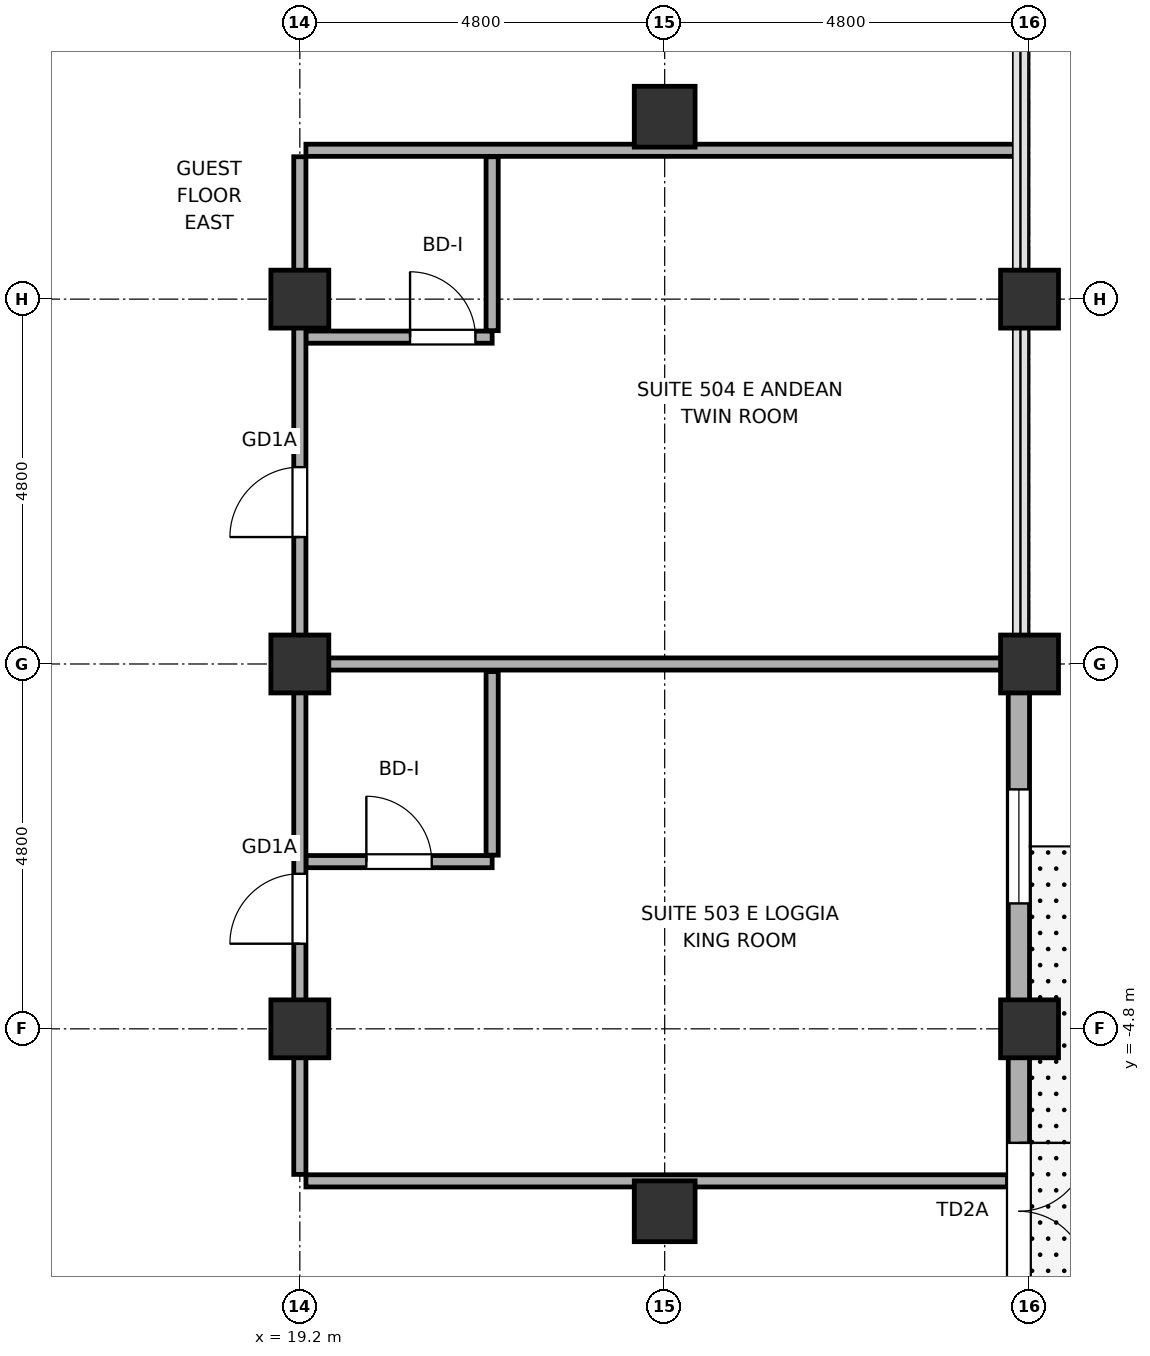
"""IFC4 building model, lengths in metres.
Left out: names, types, materials, properties, quantities, classifications, styles, units other than length and angle.
Written with IfcOpenShell. Run it as: python <this file> out.ifc"""

import sys

from ifc_helpers import new_model, si_unit, direction, frame, frame_2d, origin, origin_2d, place, context, subcontext, project, spatial, rectangle, hollow_rectangle, hollow_circle, extrude, element, fill, save


model = new_model("IFC4")
c1 = context("Model", 3, precision=1e-05, world=origin(), true_north=direction((0.0, 1.0)))
c2 = subcontext(c1, "Body", "Model", "MODEL_VIEW")
j1 = project(units=[si_unit("LENGTHUNIT", "METRE"), si_unit("PLANEANGLEUNIT", "RADIAN")], contexts=[c1])
p1 = place(None, origin())
s1 = spatial("IfcSite", under=j1, at=p1, CompositionType="ELEMENT")
p2 = place(p1, origin())
s2 = spatial("IfcBuilding", under=s1, at=p2, CompositionType="ELEMENT")
p3 = place(p2, frame((0.0, 0.0, 30.0)))
s3 = spatial("IfcBuildingStorey", under=s2, at=p3, CompositionType="ELEMENT", Elevation=30.0)
for number, where, z_axis, x_axis in (
    (1, (19.2, -4.8, 0.0), (0.0, 0.0, 1.0), (1.0, 0.0, 0.0)),
    (2, (19.2, 0.0, 0.0), (0.0, 0.0, 1.0), (1.0, 0.0, 0.0)),
    (3, (19.2, 4.8, 0.0), (0.0, 0.0, 1.0), (1.0, 0.0, 0.0)),
):
    element("IfcColumn", number, at=place(p3, frame(where, z_axis=z_axis, x_axis=x_axis)), inside=s3, PredefinedType="COLUMN", context=c2, shape_type="SweptSolid", body=[
        extrude(hollow_circle(Radius=0.381, WallThickness=0.032, at=origin_2d()), origin(), (0.0, 0.0, 1.0), 3.7),
    ])
for number, where, z_axis, x_axis in (
    (4, (24.0, -7.2, 0.0), (0.0, 0.0, 1.0), (1.0, 0.0, 0.0)),
    (5, (24.0, 7.2, 0.0), (0.0, 0.0, 1.0), (1.0, 0.0, 0.0)),
):
    element("IfcColumn", number, at=place(p3, frame(where, z_axis=z_axis, x_axis=x_axis)), inside=s3, PredefinedType="COLUMN", context=c2, shape_type="SweptSolid", body=[
        extrude(hollow_rectangle(XDim=0.8, YDim=0.8, WallThickness=0.036, at=origin_2d()), origin(), (0.0, 0.0, 1.0), 3.7),
    ])
for number, where, z_axis, x_axis in (
    (6, (28.8, -4.8, 0.0), (0.0, 0.0, 1.0), (1.0, 0.0, 0.0)),
    (7, (28.8, 0.0, 0.0), (0.0, 0.0, 1.0), (1.0, 0.0, 0.0)),
    (8, (28.8, 4.8, 0.0), (0.0, 0.0, 1.0), (1.0, 0.0, 0.0)),
):
    element("IfcColumn", number, at=place(p3, frame(where, z_axis=z_axis, x_axis=x_axis)), inside=s3, PredefinedType="COLUMN", context=c2, shape_type="SweptSolid", body=[
        extrude(hollow_circle(Radius=0.381, WallThickness=0.032, at=origin_2d()), origin(), (0.0, 0.0, 1.0), 3.7),
    ])
p4 = place(p3, frame((28.66, -20.4, 0.0), z_axis=(0.0, 0.0, 1.0), x_axis=(0.0, 1.0, 0.0)))
e9 = element("IfcWall", 9, at=p4, inside=s3, PredefinedType="SOLIDWALL", context=c2, shape_type="SweptSolid", body=[
    extrude(rectangle(XDim=20.38, YDim=0.28, at=frame_2d((10.19, 0.0))), origin(), (0.0, 0.0, 1.0), 2.12),
])
p5 = place(p4, frame((12.3, 0.0, 0.0)))
e10 = element("IfcOpeningElement", 10, at=p5, cuts=e9, PredefinedType="OPENING", context=c2, shape_type="SweptSolid", body=[
    extrude(rectangle(XDim=1.8, YDim=2.02, at=frame_2d((0.9, 1.01))), frame((0.0, 0.155, 0.0), z_axis=(0.0, -1.0, 0.0), x_axis=(1.0, 0.0, 0.0)), (0.0, 0.0, 1.0), 0.31),
])
p6 = place(p4, frame((17.25, 0.0, 0.75)))
e11 = element("IfcOpeningElement", 11, at=p6, cuts=e9, PredefinedType="OPENING", context=c2, shape_type="SweptSolid", body=[
    extrude(rectangle(XDim=1.5, YDim=1.15, at=frame_2d((0.75, 0.575))), frame((0.0, 0.155, 0.0), z_axis=(0.0, -1.0, 0.0), x_axis=(1.0, 0.0, 0.0)), (0.0, 0.0, 1.0), 0.31),
])
p7 = place(p3, frame((19.28, -6.8, 0.0), z_axis=(0.0, 0.0, 1.0), x_axis=(1.0, 0.0, 0.0)))
e12 = element("IfcWall", 12, at=p7, inside=s3, PredefinedType="PARTITIONING", context=c2, shape_type="SweptSolid", body=[
    extrude(rectangle(XDim=9.23, YDim=0.16, at=frame_2d((4.615, 0.0))), origin(), (0.0, 0.0, 1.0), 2.12),
])
p8 = place(p3, frame((19.28, -2.6, 0.0), z_axis=(0.0, 0.0, 1.0), x_axis=(1.0, 0.0, 0.0)))
e13 = element("IfcWall", 13, at=p8, inside=s3, PredefinedType="PARTITIONING", context=c2, shape_type="SweptSolid", body=[
    extrude(rectangle(XDim=2.45, YDim=0.16, at=frame_2d((1.225, 0.0))), origin(), (0.0, 0.0, 1.0), 2.82),
])
p9 = place(p8, frame((0.795, 0.0, 0.0)))
e14 = element("IfcOpeningElement", 14, at=p9, cuts=e13, PredefinedType="OPENING", context=c2, shape_type="SweptSolid", body=[
    extrude(rectangle(XDim=0.86, YDim=2.1, at=frame_2d((0.43, 1.05))), frame((0.0, 0.095, 0.0), z_axis=(0.0, -1.0, 0.0), x_axis=(1.0, 0.0, 0.0)), (0.0, 0.0, 1.0), 0.19),
])
p10 = place(p3, frame((19.28, 0.0, 0.0), z_axis=(0.0, 0.0, 1.0), x_axis=(1.0, 0.0, 0.0)))
e15 = element("IfcWall", 15, at=p10, inside=s3, PredefinedType="PARTITIONING", context=c2, shape_type="SweptSolid", body=[
    extrude(rectangle(XDim=9.35, YDim=0.16, at=frame_2d((4.675, 0.0))), origin(), (0.0, 0.0, 1.0), 2.82),
])
p11 = place(p3, frame((19.28, 4.3, 0.0), z_axis=(0.0, 0.0, 1.0), x_axis=(1.0, 0.0, 0.0)))
e16 = element("IfcWall", 16, at=p11, inside=s3, PredefinedType="PARTITIONING", context=c2, shape_type="SweptSolid", body=[
    extrude(rectangle(XDim=2.45, YDim=0.16, at=frame_2d((1.225, 0.0))), origin(), (0.0, 0.0, 1.0), 2.82),
])
p12 = place(p11, frame((1.37, 0.0, 0.0)))
e17 = element("IfcOpeningElement", 17, at=p12, cuts=e16, PredefinedType="OPENING", context=c2, shape_type="SweptSolid", body=[
    extrude(rectangle(XDim=0.86, YDim=2.1, at=frame_2d((0.43, 1.05))), frame((0.0, 0.095, 0.0), z_axis=(0.0, -1.0, 0.0), x_axis=(1.0, 0.0, 0.0)), (0.0, 0.0, 1.0), 0.19),
])
p13 = place(p3, frame((19.28, 6.758, 0.0), z_axis=(0.0, 0.0, 1.0), x_axis=(1.0, 0.0, 0.0)))
e18 = element("IfcWall", 18, at=p13, inside=s3, PredefinedType="PARTITIONING", context=c2, shape_type="SweptSolid", body=[
    extrude(rectangle(XDim=9.35, YDim=0.16, at=frame_2d((4.675, 0.0))), origin(), (0.0, 0.0, 1.0), 2.12),
])
p14 = place(p3, frame((19.2, -6.715, 0.0), z_axis=(0.0, 0.0, 1.0), x_axis=(0.0, 1.0, 0.0)))
e19 = element("IfcWall", 19, at=p14, inside=s3, PredefinedType="PARTITIONING", context=c2, shape_type="SweptSolid", body=[
    extrude(rectangle(XDim=13.388, YDim=0.16, at=frame_2d((6.694, 0.0))), origin(), (0.0, 0.0, 1.0), 2.12),
])
p15 = place(p14, frame((3.035, 0.0, 0.0)))
e20 = element("IfcOpeningElement", 20, at=p15, cuts=e19, PredefinedType="OPENING", context=c2, shape_type="SweptSolid", body=[
    extrude(rectangle(XDim=0.92, YDim=2.02, at=frame_2d((0.46, 1.01))), frame((0.0, 0.095, 0.0), z_axis=(0.0, -1.0, 0.0), x_axis=(1.0, 0.0, 0.0)), (0.0, 0.0, 1.0), 0.19),
])
p16 = place(p14, frame((8.385, 0.0, 0.0)))
e21 = element("IfcOpeningElement", 21, at=p16, cuts=e19, PredefinedType="OPENING", context=c2, shape_type="SweptSolid", body=[
    extrude(rectangle(XDim=0.92, YDim=2.02, at=frame_2d((0.46, 1.01))), frame((0.0, 0.095, 0.0), z_axis=(0.0, -1.0, 0.0), x_axis=(1.0, 0.0, 0.0)), (0.0, 0.0, 1.0), 0.19),
])
p17 = place(p3, frame((21.73, -2.515, 0.0), z_axis=(0.0, 0.0, 1.0), x_axis=(0.0, 1.0, 0.0)))
e22 = element("IfcWall", 22, at=p17, inside=s3, PredefinedType="PARTITIONING", context=c2, shape_type="SweptSolid", body=[
    extrude(rectangle(XDim=2.415, YDim=0.16, at=frame_2d((1.208, 0.0))), origin(), (0.0, 0.0, 1.0), 3.52),
])
p18 = place(p3, frame((21.73, 4.385, 0.0), z_axis=(0.0, 0.0, 1.0), x_axis=(0.0, 1.0, 0.0)))
e23 = element("IfcWall", 23, at=p18, inside=s3, PredefinedType="PARTITIONING", context=c2, shape_type="SweptSolid", body=[
    extrude(rectangle(XDim=2.288, YDim=0.16, at=frame_2d((1.144, 0.0))), origin(), (0.0, 0.0, 1.0), 3.52),
])
p19 = place(p5, origin())
e24 = element("IfcDoor", 24, at=p19, inside=s3, OperationType="DOUBLE_DOOR_SINGLE_SWING", PredefinedType="DOOR", context=c2, shape_type="SweptSolid", body=[
    extrude(rectangle(XDim=1.8, YDim=2.02, at=frame_2d((0.9, 1.01))), frame((0.0, 0.025, 0.0), z_axis=(0.0, -1.0, 0.0), x_axis=(1.0, 0.0, 0.0)), (0.0, 0.0, 1.0), 0.05),
])
fill(e10, e24)
p20 = place(p6, origin())
e25 = element("IfcWindow", 25, at=p20, inside=s3, PartitioningType="SINGLE_PANEL", PredefinedType="WINDOW", context=c2, shape_type="SweptSolid", body=[
    extrude(rectangle(XDim=1.5, YDim=1.15, at=frame_2d((0.75, 0.575))), frame((0.0, 0.03, 0.0), z_axis=(0.0, -1.0, 0.0), x_axis=(1.0, 0.0, 0.0)), (0.0, 0.0, 1.0), 0.06),
])
fill(e11, e25)
p21 = place(p15, origin())
e26 = element("IfcDoor", 26, at=p21, inside=s3, OperationType="SINGLE_SWING_RIGHT", PredefinedType="DOOR", context=c2, shape_type="SweptSolid", body=[
    extrude(rectangle(XDim=0.92, YDim=2.02, at=frame_2d((0.46, 1.01))), frame((0.0, 0.025, 0.0), z_axis=(0.0, -1.0, 0.0), x_axis=(1.0, 0.0, 0.0)), (0.0, 0.0, 1.0), 0.05),
])
fill(e20, e26)
p22 = place(p9, origin())
e27 = element("IfcDoor", 27, at=p22, inside=s3, OperationType="SINGLE_SWING_RIGHT", PredefinedType="DOOR", context=c2, shape_type="SweptSolid", body=[
    extrude(rectangle(XDim=0.86, YDim=2.1, at=frame_2d((0.43, 1.05))), frame((0.0, 0.025, 0.0), z_axis=(0.0, -1.0, 0.0), x_axis=(1.0, 0.0, 0.0)), (0.0, 0.0, 1.0), 0.05),
])
fill(e14, e27)
p23 = place(p16, origin())
e28 = element("IfcDoor", 28, at=p23, inside=s3, OperationType="SINGLE_SWING_LEFT", PredefinedType="DOOR", context=c2, shape_type="SweptSolid", body=[
    extrude(rectangle(XDim=0.92, YDim=2.02, at=frame_2d((0.46, 1.01))), frame((0.0, 0.025, 0.0), z_axis=(0.0, -1.0, 0.0), x_axis=(1.0, 0.0, 0.0)), (0.0, 0.0, 1.0), 0.05),
])
fill(e21, e28)
p24 = place(p12, origin())
e29 = element("IfcDoor", 29, at=p24, inside=s3, OperationType="SINGLE_SWING_RIGHT", PredefinedType="DOOR", context=c2, shape_type="SweptSolid", body=[
    extrude(rectangle(XDim=0.86, YDim=2.1, at=frame_2d((0.43, 1.05))), frame((0.0, 0.025, 0.0), z_axis=(0.0, -1.0, 0.0), x_axis=(1.0, 0.0, 0.0)), (0.0, 0.0, 1.0), 0.05),
])
fill(e17, e29)
save(model, sys.argv[1])
